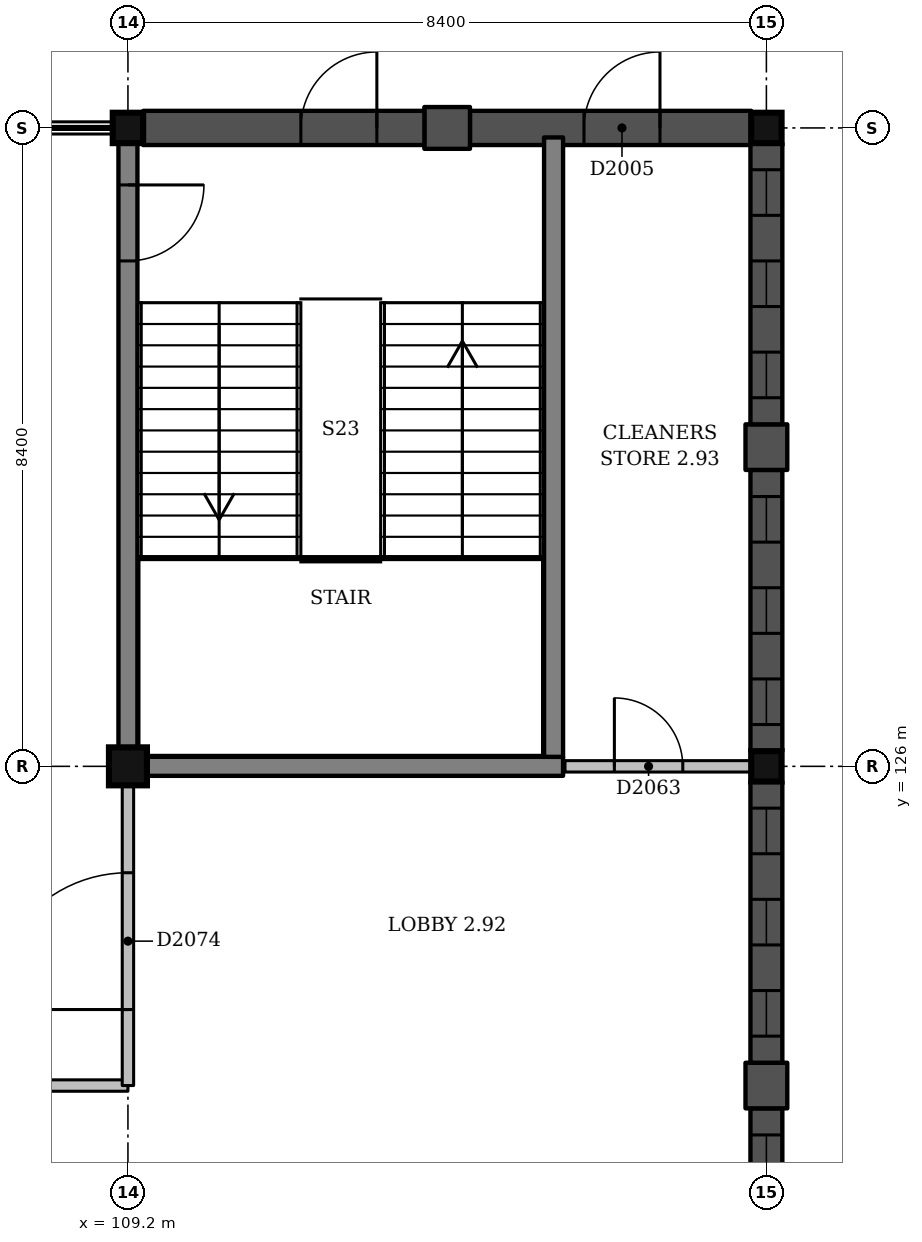
"""IFC4 building model, lengths in metres.
Left out: names, types, materials, properties, quantities, classifications, styles, units other than length and angle.
Written with IfcOpenShell. Run it as: python <this file> out.ifc"""

import sys

from ifc_helpers import new_model, si_unit, direction, frame, frame_2d, origin, origin_2d, place, context, subcontext, project, spatial, rectangle, extrude, element, fill, save


model = new_model("IFC4")
c1 = context("Model", 3, precision=1e-05, world=origin(), true_north=direction((0.0, 1.0)))
c2 = subcontext(c1, "Body", "Model", "MODEL_VIEW")
j1 = project(units=[si_unit("LENGTHUNIT", "METRE"), si_unit("PLANEANGLEUNIT", "RADIAN")], contexts=[c1])
p1 = place(None, origin())
s1 = spatial("IfcSite", under=j1, at=p1, CompositionType="ELEMENT")
p2 = place(p1, origin())
s2 = spatial("IfcBuilding", under=s1, at=p2, CompositionType="ELEMENT")
p3 = place(p2, frame((0.0, 0.0, 9.0)))
s3 = spatial("IfcBuildingStorey", under=s2, at=p3, CompositionType="ELEMENT", Elevation=9.0)
p4 = place(p3, frame((109.2, 126.0, -1.5), z_axis=(0.0, 0.0, 1.0), x_axis=(1.0, 0.0, 0.0)))
e1 = element("IfcColumn", 1, at=p4, inside=s3, PredefinedType="COLUMN", context=c2, shape_type="SweptSolid", body=[
    extrude(rectangle(XDim=0.5, YDim=0.5, at=origin_2d()), origin(), (0.0, 0.0, 1.0), 6.0),
])
for number, where, z_axis, x_axis in (
    (2, (109.2, 134.4, -1.5), (0.0, 0.0, 1.0), (1.0, 0.0, 0.0)),
    (3, (117.6, 126.0, -1.5), (0.0, 0.0, 1.0), (1.0, 0.0, 0.0)),
    (4, (117.6, 134.4, -1.5), (0.0, 0.0, 1.0), (1.0, 0.0, 0.0)),
):
    element("IfcColumn", number, at=place(p3, frame(where, z_axis=z_axis, x_axis=x_axis)), inside=s3, PredefinedType="COLUMN", context=c2, shape_type="SweptSolid", body=[
        extrude(rectangle(XDim=0.4, YDim=0.4, at=origin_2d()), origin(), (0.0, 0.0, 1.0), 6.0),
    ])
p5 = place(p3, frame((109.45, 126.0, 0.0), z_axis=(0.0, 0.0, 1.0), x_axis=(1.0, 0.0, 0.0)))
e5 = element("IfcWall", 5, at=p5, inside=s3, PredefinedType="SHEAR", context=c2, shape_type="SweptSolid", body=[
    extrude(rectangle(XDim=5.475, YDim=0.25, at=frame_2d((2.738, 0.0))), origin(), (0.0, 0.0, 1.0), 4.5),
])
p6 = place(p3, frame((109.2, 126.25, 0.0), z_axis=(0.0, 0.0, 1.0), x_axis=(0.0, 1.0, 0.0)))
e6 = element("IfcWall", 6, at=p6, inside=s3, PredefinedType="SHEAR", context=c2, shape_type="SweptSolid", body=[
    extrude(rectangle(XDim=7.95, YDim=0.25, at=frame_2d((3.975, 0.0))), origin(), (0.0, 0.0, 1.0), 4.5),
])
p7 = place(p6, frame((6.4, 0.0, 0.0)))
e7 = element("IfcOpeningElement", 7, at=p7, cuts=e6, PredefinedType="OPENING", context=c2, shape_type="SweptSolid", body=[
    extrude(rectangle(XDim=1.0, YDim=2.1, at=frame_2d((0.5, 1.05))), frame((0.0, 0.135, 0.0), z_axis=(0.0, -1.0, 0.0), x_axis=(1.0, 0.0, 0.0)), (0.0, 0.0, 1.0), 0.27),
])
p8 = place(p3, frame((114.8, 126.125, 0.0), z_axis=(0.0, 0.0, 1.0), x_axis=(0.0, 1.0, 0.0)))
e8 = element("IfcWall", 8, at=p8, inside=s3, PredefinedType="SHEAR", context=c2, shape_type="SweptSolid", body=[
    extrude(rectangle(XDim=8.15, YDim=0.25, at=frame_2d((4.075, 0.0))), origin(), (0.0, 0.0, 1.0), 4.5),
])
p9 = place(p3, frame((117.6, 117.8, 0.0), z_axis=(0.0, 0.0, 1.0), x_axis=(0.0, 1.0, 0.0)))
e9 = element("IfcWall", 9, at=p9, inside=s3, PredefinedType="SOLIDWALL", context=c2, shape_type="SweptSolid", body=[
    extrude(rectangle(XDim=3.7, YDim=0.42, at=frame_2d((1.85, 0.0))), origin(), (0.0, 0.0, 1.0), 3.45),
])
p10 = place(p9, frame((0.35, 0.0, 1.0)))
e10 = element("IfcOpeningElement", 10, at=p10, cuts=e9, PredefinedType="OPENING", context=c2, shape_type="SweptSolid", body=[
    extrude(rectangle(XDim=0.6, YDim=2.1, at=frame_2d((0.3, 1.05))), frame((0.0, 0.22, 0.0), z_axis=(0.0, -1.0, 0.0), x_axis=(1.0, 0.0, 0.0)), (0.0, 0.0, 1.0), 0.44),
])
p11 = place(p9, frame((1.55, 0.0, 1.0)))
e11 = element("IfcOpeningElement", 11, at=p11, cuts=e9, PredefinedType="OPENING", context=c2, shape_type="SweptSolid", body=[
    extrude(rectangle(XDim=0.6, YDim=2.1, at=frame_2d((0.3, 1.05))), frame((0.0, 0.22, 0.0), z_axis=(0.0, -1.0, 0.0), x_axis=(1.0, 0.0, 0.0)), (0.0, 0.0, 1.0), 0.44),
])
p12 = place(p9, frame((2.75, 0.0, 1.0)))
e12 = element("IfcOpeningElement", 12, at=p12, cuts=e9, PredefinedType="OPENING", context=c2, shape_type="SweptSolid", body=[
    extrude(rectangle(XDim=0.6, YDim=2.1, at=frame_2d((0.3, 1.05))), frame((0.0, 0.22, 0.0), z_axis=(0.0, -1.0, 0.0), x_axis=(1.0, 0.0, 0.0)), (0.0, 0.0, 1.0), 0.44),
])
p13 = place(p3, frame((117.6, 121.5, 0.0), z_axis=(0.0, 0.0, 1.0), x_axis=(0.0, 1.0, 0.0)))
e13 = element("IfcWall", 13, at=p13, inside=s3, PredefinedType="SOLIDWALL", context=c2, shape_type="SweptSolid", body=[
    extrude(rectangle(XDim=0.6, YDim=0.55, at=frame_2d((0.3, 0.0))), origin(), (0.0, 0.0, 1.0), 3.45),
])
p14 = place(p3, frame((117.6, 122.1, 0.0), z_axis=(0.0, 0.0, 1.0), x_axis=(0.0, 1.0, 0.0)))
e14 = element("IfcWall", 14, at=p14, inside=s3, PredefinedType="SOLIDWALL", context=c2, shape_type="SweptSolid", body=[
    extrude(rectangle(XDim=3.7, YDim=0.42, at=frame_2d((1.85, 0.0))), origin(), (0.0, 0.0, 1.0), 3.45),
])
p15 = place(p14, frame((0.35, 0.0, 1.0)))
e15 = element("IfcOpeningElement", 15, at=p15, cuts=e14, PredefinedType="OPENING", context=c2, shape_type="SweptSolid", body=[
    extrude(rectangle(XDim=0.6, YDim=2.1, at=frame_2d((0.3, 1.05))), frame((0.0, 0.22, 0.0), z_axis=(0.0, -1.0, 0.0), x_axis=(1.0, 0.0, 0.0)), (0.0, 0.0, 1.0), 0.44),
])
p16 = place(p14, frame((1.55, 0.0, 1.0)))
e16 = element("IfcOpeningElement", 16, at=p16, cuts=e14, PredefinedType="OPENING", context=c2, shape_type="SweptSolid", body=[
    extrude(rectangle(XDim=0.6, YDim=2.1, at=frame_2d((0.3, 1.05))), frame((0.0, 0.22, 0.0), z_axis=(0.0, -1.0, 0.0), x_axis=(1.0, 0.0, 0.0)), (0.0, 0.0, 1.0), 0.44),
])
p17 = place(p14, frame((2.75, 0.0, 1.0)))
e17 = element("IfcOpeningElement", 17, at=p17, cuts=e14, PredefinedType="OPENING", context=c2, shape_type="SweptSolid", body=[
    extrude(rectangle(XDim=0.6, YDim=2.1, at=frame_2d((0.3, 1.05))), frame((0.0, 0.22, 0.0), z_axis=(0.0, -1.0, 0.0), x_axis=(1.0, 0.0, 0.0)), (0.0, 0.0, 1.0), 0.44),
])
p18 = place(p3, frame((117.6, 126.2, 0.0), z_axis=(0.0, 0.0, 1.0), x_axis=(0.0, 1.0, 0.0)))
e18 = element("IfcWall", 18, at=p18, inside=s3, PredefinedType="SOLIDWALL", context=c2, shape_type="SweptSolid", body=[
    extrude(rectangle(XDim=3.7, YDim=0.42, at=frame_2d((1.85, 0.0))), origin(), (0.0, 0.0, 1.0), 3.45),
])
p19 = place(p18, frame((0.35, 0.0, 1.0)))
e19 = element("IfcOpeningElement", 19, at=p19, cuts=e18, PredefinedType="OPENING", context=c2, shape_type="SweptSolid", body=[
    extrude(rectangle(XDim=0.6, YDim=2.1, at=frame_2d((0.3, 1.05))), frame((0.0, 0.22, 0.0), z_axis=(0.0, -1.0, 0.0), x_axis=(1.0, 0.0, 0.0)), (0.0, 0.0, 1.0), 0.44),
])
p20 = place(p18, frame((1.55, 0.0, 1.0)))
e20 = element("IfcOpeningElement", 20, at=p20, cuts=e18, PredefinedType="OPENING", context=c2, shape_type="SweptSolid", body=[
    extrude(rectangle(XDim=0.6, YDim=2.1, at=frame_2d((0.3, 1.05))), frame((0.0, 0.22, 0.0), z_axis=(0.0, -1.0, 0.0), x_axis=(1.0, 0.0, 0.0)), (0.0, 0.0, 1.0), 0.44),
])
p21 = place(p18, frame((2.75, 0.0, 1.0)))
e21 = element("IfcOpeningElement", 21, at=p21, cuts=e18, PredefinedType="OPENING", context=c2, shape_type="SweptSolid", body=[
    extrude(rectangle(XDim=0.6, YDim=2.1, at=frame_2d((0.3, 1.05))), frame((0.0, 0.22, 0.0), z_axis=(0.0, -1.0, 0.0), x_axis=(1.0, 0.0, 0.0)), (0.0, 0.0, 1.0), 0.44),
])
p22 = place(p3, frame((117.6, 129.9, 0.0), z_axis=(0.0, 0.0, 1.0), x_axis=(0.0, 1.0, 0.0)))
e22 = element("IfcWall", 22, at=p22, inside=s3, PredefinedType="SOLIDWALL", context=c2, shape_type="SweptSolid", body=[
    extrude(rectangle(XDim=0.6, YDim=0.55, at=frame_2d((0.3, 0.0))), origin(), (0.0, 0.0, 1.0), 3.45),
])
p23 = place(p3, frame((117.6, 130.5, 0.0), z_axis=(0.0, 0.0, 1.0), x_axis=(0.0, 1.0, 0.0)))
e23 = element("IfcWall", 23, at=p23, inside=s3, PredefinedType="SOLIDWALL", context=c2, shape_type="SweptSolid", body=[
    extrude(rectangle(XDim=3.7, YDim=0.42, at=frame_2d((1.85, 0.0))), origin(), (0.0, 0.0, 1.0), 3.45),
])
p24 = place(p23, frame((0.35, 0.0, 1.0)))
e24 = element("IfcOpeningElement", 24, at=p24, cuts=e23, PredefinedType="OPENING", context=c2, shape_type="SweptSolid", body=[
    extrude(rectangle(XDim=0.6, YDim=2.1, at=frame_2d((0.3, 1.05))), frame((0.0, 0.22, 0.0), z_axis=(0.0, -1.0, 0.0), x_axis=(1.0, 0.0, 0.0)), (0.0, 0.0, 1.0), 0.44),
])
p25 = place(p23, frame((1.55, 0.0, 1.0)))
e25 = element("IfcOpeningElement", 25, at=p25, cuts=e23, PredefinedType="OPENING", context=c2, shape_type="SweptSolid", body=[
    extrude(rectangle(XDim=0.6, YDim=2.1, at=frame_2d((0.3, 1.05))), frame((0.0, 0.22, 0.0), z_axis=(0.0, -1.0, 0.0), x_axis=(1.0, 0.0, 0.0)), (0.0, 0.0, 1.0), 0.44),
])
p26 = place(p23, frame((2.75, 0.0, 1.0)))
e26 = element("IfcOpeningElement", 26, at=p26, cuts=e23, PredefinedType="OPENING", context=c2, shape_type="SweptSolid", body=[
    extrude(rectangle(XDim=0.6, YDim=2.1, at=frame_2d((0.3, 1.05))), frame((0.0, 0.22, 0.0), z_axis=(0.0, -1.0, 0.0), x_axis=(1.0, 0.0, 0.0)), (0.0, 0.0, 1.0), 0.44),
])
p27 = place(p3, frame((117.4, 134.4, 0.0), z_axis=(0.0, 0.0, 1.0), x_axis=(-1.0, 0.0, 0.0)))
e27 = element("IfcWall", 27, at=p27, inside=s3, PredefinedType="SOLIDWALL", context=c2, shape_type="SweptSolid", body=[
    extrude(rectangle(XDim=3.7, YDim=0.45, at=frame_2d((1.85, 0.0))), origin(), (0.0, 0.0, 1.0), 3.45),
])
p28 = place(p27, frame((1.2, 0.0, 0.0)))
e28 = element("IfcOpeningElement", 28, at=p28, cuts=e27, PredefinedType="OPENING", context=c2, shape_type="SweptSolid", body=[
    extrude(rectangle(XDim=1.0, YDim=2.1, at=frame_2d((0.5, 1.05))), frame((0.0, 0.235, 0.0), z_axis=(0.0, -1.0, 0.0), x_axis=(1.0, 0.0, 0.0)), (0.0, 0.0, 1.0), 0.47),
])
p29 = place(p3, frame((113.7, 134.4, 0.0), z_axis=(0.0, 0.0, 1.0), x_axis=(-1.0, 0.0, 0.0)))
e29 = element("IfcWall", 29, at=p29, inside=s3, PredefinedType="SOLIDWALL", context=c2, shape_type="SweptSolid", body=[
    extrude(rectangle(XDim=0.6, YDim=0.55, at=frame_2d((0.3, 0.0))), origin(), (0.0, 0.0, 1.0), 3.45),
])
p30 = place(p3, frame((113.1, 134.4, 0.0), z_axis=(0.0, 0.0, 1.0), x_axis=(-1.0, 0.0, 0.0)))
e30 = element("IfcWall", 30, at=p30, inside=s3, PredefinedType="SOLIDWALL", context=c2, shape_type="SweptSolid", body=[
    extrude(rectangle(XDim=3.7, YDim=0.45, at=frame_2d((1.85, 0.0))), origin(), (0.0, 0.0, 1.0), 3.45),
])
p31 = place(p30, frame((1.625, 0.0, 0.0), z_axis=(0.0, 0.0, 1.0), x_axis=(-1.0, 0.0, 0.0)))
e31 = element("IfcOpeningElement", 31, at=p31, cuts=e30, PredefinedType="OPENING", context=c2, shape_type="SweptSolid", body=[
    extrude(rectangle(XDim=1.0, YDim=2.1, at=frame_2d((0.5, 1.05))), frame((0.0, 0.235, 0.0), z_axis=(0.0, -1.0, 0.0), x_axis=(1.0, 0.0, 0.0)), (0.0, 0.0, 1.0), 0.47),
])
p32 = place(p3, frame((81.2, 121.8, 0.0), z_axis=(0.0, 0.0, 1.0), x_axis=(1.0, 0.0, 0.0)))
e32 = element("IfcWall", 32, at=p32, inside=s3, PredefinedType="PARTITIONING", context=c2, shape_type="SweptSolid", body=[
    extrude(rectangle(XDim=28.0, YDim=0.15, at=frame_2d((14.0, 0.0))), origin(), (0.0, 0.0, 1.0), 3.4),
])
p33 = place(p32, frame((0.3, 0.0, 0.0)))
e33 = element("IfcOpeningElement", 33, at=p33, cuts=e32, PredefinedType="OPENING", context=c2, shape_type="SweptSolid", body=[
    extrude(rectangle(XDim=1.8, YDim=2.1, at=frame_2d((0.9, 1.05))), frame((0.0, 0.085, 0.0), z_axis=(0.0, -1.0, 0.0), x_axis=(1.0, 0.0, 0.0)), (0.0, 0.0, 1.0), 0.17),
])
p34 = place(p32, frame((14.3, 0.0, 0.0)))
e34 = element("IfcOpeningElement", 34, at=p34, cuts=e32, PredefinedType="OPENING", context=c2, shape_type="SweptSolid", body=[
    extrude(rectangle(XDim=1.8, YDim=2.1, at=frame_2d((0.9, 1.05))), frame((0.0, 0.085, 0.0), z_axis=(0.0, -1.0, 0.0), x_axis=(1.0, 0.0, 0.0)), (0.0, 0.0, 1.0), 0.17),
])
p35 = place(p3, frame((114.95, 126.0, 0.0), z_axis=(0.0, 0.0, 1.0), x_axis=(1.0, 0.0, 0.0)))
e35 = element("IfcWall", 35, at=p35, inside=s3, PredefinedType="PARTITIONING", context=c2, shape_type="SweptSolid", body=[
    extrude(rectangle(XDim=2.45, YDim=0.15, at=frame_2d((1.225, 0.0))), origin(), (0.0, 0.0, 1.0), 3.6),
])
p36 = place(p35, frame((0.65, 0.0, 0.0)))
e36 = element("IfcOpeningElement", 36, at=p36, cuts=e35, PredefinedType="OPENING", context=c2, shape_type="SweptSolid", body=[
    extrude(rectangle(XDim=0.9, YDim=2.1, at=frame_2d((0.45, 1.05))), frame((0.0, 0.085, 0.0), z_axis=(0.0, -1.0, 0.0), x_axis=(1.0, 0.0, 0.0)), (0.0, 0.0, 1.0), 0.17),
])
p37 = place(p3, frame((109.2, 121.8, 0.0), z_axis=(0.0, 0.0, 1.0), x_axis=(0.0, 1.0, 0.0)))
e37 = element("IfcWall", 37, at=p37, inside=s3, PredefinedType="PARTITIONING", context=c2, shape_type="SweptSolid", body=[
    extrude(rectangle(XDim=3.95, YDim=0.15, at=frame_2d((1.975, 0.0))), origin(), (0.0, 0.0, 1.0), 3.5),
])
p38 = place(p37, frame((1.0, 0.0, 0.0)))
e38 = element("IfcOpeningElement", 38, at=p38, cuts=e37, PredefinedType="OPENING", context=c2, shape_type="SweptSolid", body=[
    extrude(rectangle(XDim=1.8, YDim=2.1, at=frame_2d((0.9, 1.05))), frame((0.0, 0.085, 0.0), z_axis=(0.0, -1.0, 0.0), x_axis=(1.0, 0.0, 0.0)), (0.0, 0.0, 1.0), 0.17),
])
p39 = place(p12, origin())
e39 = element("IfcWindow", 39, at=p39, inside=s3, PartitioningType="SINGLE_PANEL", PredefinedType="WINDOW", context=c2, shape_type="SweptSolid", body=[
    extrude(rectangle(XDim=0.6, YDim=2.1, at=frame_2d((0.3, 1.05))), frame((0.0, 0.15, 0.0), z_axis=(0.0, -1.0, 0.0), x_axis=(1.0, 0.0, 0.0)), (0.0, 0.0, 1.0), 0.06),
])
fill(e12, e39)
p40 = place(p15, origin())
e40 = element("IfcWindow", 40, at=p40, inside=s3, PartitioningType="SINGLE_PANEL", PredefinedType="WINDOW", context=c2, shape_type="SweptSolid", body=[
    extrude(rectangle(XDim=0.6, YDim=2.1, at=frame_2d((0.3, 1.05))), frame((0.0, 0.15, 0.0), z_axis=(0.0, -1.0, 0.0), x_axis=(1.0, 0.0, 0.0)), (0.0, 0.0, 1.0), 0.06),
])
fill(e15, e40)
p41 = place(p16, origin())
e41 = element("IfcWindow", 41, at=p41, inside=s3, PartitioningType="SINGLE_PANEL", PredefinedType="WINDOW", context=c2, shape_type="SweptSolid", body=[
    extrude(rectangle(XDim=0.6, YDim=2.1, at=frame_2d((0.3, 1.05))), frame((0.0, 0.15, 0.0), z_axis=(0.0, -1.0, 0.0), x_axis=(1.0, 0.0, 0.0)), (0.0, 0.0, 1.0), 0.06),
])
fill(e16, e41)
p42 = place(p17, origin())
e42 = element("IfcWindow", 42, at=p42, inside=s3, PartitioningType="SINGLE_PANEL", PredefinedType="WINDOW", context=c2, shape_type="SweptSolid", body=[
    extrude(rectangle(XDim=0.6, YDim=2.1, at=frame_2d((0.3, 1.05))), frame((0.0, 0.15, 0.0), z_axis=(0.0, -1.0, 0.0), x_axis=(1.0, 0.0, 0.0)), (0.0, 0.0, 1.0), 0.06),
])
fill(e17, e42)
p43 = place(p19, origin())
e43 = element("IfcWindow", 43, at=p43, inside=s3, PartitioningType="SINGLE_PANEL", PredefinedType="WINDOW", context=c2, shape_type="SweptSolid", body=[
    extrude(rectangle(XDim=0.6, YDim=2.1, at=frame_2d((0.3, 1.05))), frame((0.0, 0.15, 0.0), z_axis=(0.0, -1.0, 0.0), x_axis=(1.0, 0.0, 0.0)), (0.0, 0.0, 1.0), 0.06),
])
fill(e19, e43)
p44 = place(p20, origin())
e44 = element("IfcWindow", 44, at=p44, inside=s3, PartitioningType="SINGLE_PANEL", PredefinedType="WINDOW", context=c2, shape_type="SweptSolid", body=[
    extrude(rectangle(XDim=0.6, YDim=2.1, at=frame_2d((0.3, 1.05))), frame((0.0, 0.15, 0.0), z_axis=(0.0, -1.0, 0.0), x_axis=(1.0, 0.0, 0.0)), (0.0, 0.0, 1.0), 0.06),
])
fill(e20, e44)
p45 = place(p21, origin())
e45 = element("IfcWindow", 45, at=p45, inside=s3, PartitioningType="SINGLE_PANEL", PredefinedType="WINDOW", context=c2, shape_type="SweptSolid", body=[
    extrude(rectangle(XDim=0.6, YDim=2.1, at=frame_2d((0.3, 1.05))), frame((0.0, 0.15, 0.0), z_axis=(0.0, -1.0, 0.0), x_axis=(1.0, 0.0, 0.0)), (0.0, 0.0, 1.0), 0.06),
])
fill(e21, e45)
p46 = place(p24, origin())
e46 = element("IfcWindow", 46, at=p46, inside=s3, PartitioningType="SINGLE_PANEL", PredefinedType="WINDOW", context=c2, shape_type="SweptSolid", body=[
    extrude(rectangle(XDim=0.6, YDim=2.1, at=frame_2d((0.3, 1.05))), frame((0.0, 0.15, 0.0), z_axis=(0.0, -1.0, 0.0), x_axis=(1.0, 0.0, 0.0)), (0.0, 0.0, 1.0), 0.06),
])
fill(e24, e46)
p47 = place(p25, origin())
e47 = element("IfcWindow", 47, at=p47, inside=s3, PartitioningType="SINGLE_PANEL", PredefinedType="WINDOW", context=c2, shape_type="SweptSolid", body=[
    extrude(rectangle(XDim=0.6, YDim=2.1, at=frame_2d((0.3, 1.05))), frame((0.0, 0.15, 0.0), z_axis=(0.0, -1.0, 0.0), x_axis=(1.0, 0.0, 0.0)), (0.0, 0.0, 1.0), 0.06),
])
fill(e25, e47)
p48 = place(p26, origin())
e48 = element("IfcWindow", 48, at=p48, inside=s3, PartitioningType="SINGLE_PANEL", PredefinedType="WINDOW", context=c2, shape_type="SweptSolid", body=[
    extrude(rectangle(XDim=0.6, YDim=2.1, at=frame_2d((0.3, 1.05))), frame((0.0, 0.15, 0.0), z_axis=(0.0, -1.0, 0.0), x_axis=(1.0, 0.0, 0.0)), (0.0, 0.0, 1.0), 0.06),
])
fill(e26, e48)
p49 = place(p28, origin())
e49 = element("IfcDoor", 49, at=p49, inside=s3, OperationType="SINGLE_SWING_LEFT", PredefinedType="DOOR", context=c2, shape_type="SweptSolid", body=[
    extrude(rectangle(XDim=1.0, YDim=2.1, at=frame_2d((0.5, 1.05))), frame((0.0, 0.025, 0.0), z_axis=(0.0, -1.0, 0.0), x_axis=(1.0, 0.0, 0.0)), (0.0, 0.0, 1.0), 0.05),
])
fill(e28, e49)
p50 = place(p36, origin())
e50 = element("IfcDoor", 50, at=p50, inside=s3, OperationType="SINGLE_SWING_LEFT", PredefinedType="DOOR", context=c2, shape_type="SweptSolid", body=[
    extrude(rectangle(XDim=0.9, YDim=2.1, at=frame_2d((0.45, 1.05))), frame((0.0, 0.025, 0.0), z_axis=(0.0, -1.0, 0.0), x_axis=(1.0, 0.0, 0.0)), (0.0, 0.0, 1.0), 0.05),
])
fill(e36, e50)
p51 = place(p38, origin())
e51 = element("IfcDoor", 51, at=p51, inside=s3, OperationType="DOUBLE_DOOR_SINGLE_SWING", PredefinedType="DOOR", context=c2, shape_type="SweptSolid", body=[
    extrude(rectangle(XDim=1.8, YDim=2.1, at=frame_2d((0.9, 1.05))), frame((0.0, 0.025, 0.0), z_axis=(0.0, -1.0, 0.0), x_axis=(1.0, 0.0, 0.0)), (0.0, 0.0, 1.0), 0.05),
])
fill(e38, e51)
p52 = place(p7, origin())
e52 = element("IfcDoor", 52, at=p52, inside=s3, OperationType="SINGLE_SWING_RIGHT", PredefinedType="DOOR", context=c2, shape_type="SweptSolid", body=[
    extrude(rectangle(XDim=1.0, YDim=2.1, at=frame_2d((0.5, 1.05))), frame((0.0, 0.025, 0.0), z_axis=(0.0, -1.0, 0.0), x_axis=(1.0, 0.0, 0.0)), (0.0, 0.0, 1.0), 0.05),
])
fill(e7, e52)
p53 = place(p31, origin())
e53 = element("IfcDoor", 53, at=p53, inside=s3, OperationType="SINGLE_SWING_LEFT", PredefinedType="DOOR", context=c2, shape_type="SweptSolid", body=[
    extrude(rectangle(XDim=1.0, YDim=2.1, at=frame_2d((0.5, 1.05))), frame((0.0, 0.025, 0.0), z_axis=(0.0, -1.0, 0.0), x_axis=(1.0, 0.0, 0.0)), (0.0, 0.0, 1.0), 0.05),
])
fill(e31, e53)
save(model, sys.argv[1])
